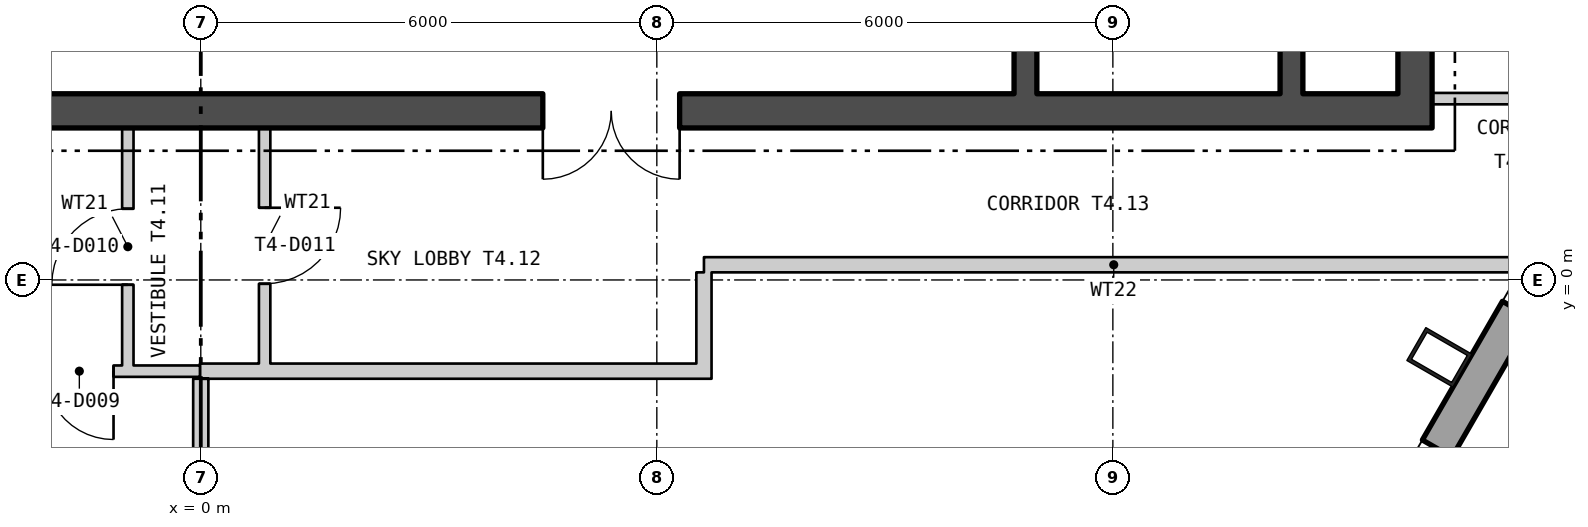
"""IFC4 building model, lengths in metres.
Left out: names, types, materials, properties, quantities, classifications, styles, units other than length and angle.
Written with IfcOpenShell. Run it as: python <this file> out.ifc"""

import sys

from ifc_helpers import new_model, si_unit, direction, frame, frame_2d, origin, origin_2d, place, context, subcontext, project, spatial, polyline, rectangle, hollow_rectangle, outline, extrude, element, fill, save


model = new_model("IFC4")
c1 = context("Model", 3, precision=1e-05, world=origin(), true_north=direction((0.0, 1.0)))
c2 = subcontext(c1, "Body", "Model", "MODEL_VIEW")
j1 = project(units=[si_unit("LENGTHUNIT", "METRE"), si_unit("PLANEANGLEUNIT", "RADIAN")], contexts=[c1])
p1 = place(None, origin())
s1 = spatial("IfcSite", under=j1, at=p1, CompositionType="ELEMENT")
p2 = place(p1, origin())
s2 = spatial("IfcBuilding", under=s1, at=p2, CompositionType="ELEMENT")
p3 = place(p2, frame((0.0, 0.0, 239.4)))
s3 = spatial("IfcBuildingStorey", under=s2, at=p3, CompositionType="ELEMENT", Elevation=239.4)
p4 = place(p3, frame((16.296, -1.018, 0.0), z_axis=(0.0, 0.0, 1.0), x_axis=(0.5, 0.866025403784, 0.0)))
e1 = element("IfcColumn", 1, at=p4, inside=s3, PredefinedType="COLUMN", context=c2, shape_type="SweptSolid", body=[
    extrude(hollow_rectangle(XDim=0.5, YDim=0.7, WallThickness=0.045, at=origin_2d()), origin(), (0.0, 0.0, 1.0), 6.0),
])
p5 = place(p3, frame((3.105, -25.015, -0.18), z_axis=(0.0, 0.0, 1.0), x_axis=(0.499999764979, 0.866025539474, 0.0)))
e2 = element("IfcWall", 2, at=p5, inside=s3, PredefinedType="SOLIDWALL", context=c2, shape_type="SweptSolid", body=[
    extrude(outline(polyline([(-0.13, -0.225), (45.87, -0.225), (45.61, 0.225), (0.13, 0.225), (-0.13, -0.225)])), origin(), (0.0, 0.0, 1.0), 6.0),
])
p6 = place(p5, frame((1.424, 0.0, 1.38)))
e3 = element("IfcOpeningElement", 3, at=p6, cuts=e2, PredefinedType="OPENING", context=c2, shape_type="SweptSolid", body=[
    extrude(rectangle(XDim=2.4, YDim=3.6, at=frame_2d((1.2, 1.8))), frame((0.0, 0.235, 0.0), z_axis=(0.0, -1.0, 0.0), x_axis=(1.0, 0.0, 0.0)), (0.0, 0.0, 1.0), 0.47),
])
p7 = place(p5, frame((5.893, 0.0, 1.38)))
e4 = element("IfcOpeningElement", 4, at=p7, cuts=e2, PredefinedType="OPENING", context=c2, shape_type="SweptSolid", body=[
    extrude(rectangle(XDim=2.4, YDim=3.6, at=frame_2d((1.2, 1.8))), frame((0.0, 0.235, 0.0), z_axis=(0.0, -1.0, 0.0), x_axis=(1.0, 0.0, 0.0)), (0.0, 0.0, 1.0), 0.47),
])
p8 = place(p5, frame((10.401, 0.0, 1.38)))
e5 = element("IfcOpeningElement", 5, at=p8, cuts=e2, PredefinedType="OPENING", context=c2, shape_type="SweptSolid", body=[
    extrude(rectangle(XDim=2.4, YDim=3.6, at=frame_2d((1.2, 1.8))), frame((0.0, 0.235, 0.0), z_axis=(0.0, -1.0, 0.0), x_axis=(1.0, 0.0, 0.0)), (0.0, 0.0, 1.0), 0.47),
])
p9 = place(p5, frame((14.909, 0.0, 1.38)))
e6 = element("IfcOpeningElement", 6, at=p9, cuts=e2, PredefinedType="OPENING", context=c2, shape_type="SweptSolid", body=[
    extrude(rectangle(XDim=2.4, YDim=3.6, at=frame_2d((1.2, 1.8))), frame((0.0, 0.235, 0.0), z_axis=(0.0, -1.0, 0.0), x_axis=(1.0, 0.0, 0.0)), (0.0, 0.0, 1.0), 0.47),
])
p10 = place(p5, frame((19.416, 0.0, 1.38)))
e7 = element("IfcOpeningElement", 7, at=p10, cuts=e2, PredefinedType="OPENING", context=c2, shape_type="SweptSolid", body=[
    extrude(rectangle(XDim=2.4, YDim=3.6, at=frame_2d((1.2, 1.8))), frame((0.0, 0.235, 0.0), z_axis=(0.0, -1.0, 0.0), x_axis=(1.0, 0.0, 0.0)), (0.0, 0.0, 1.0), 0.47),
])
p11 = place(p5, frame((23.924, 0.0, 1.38)))
e8 = element("IfcOpeningElement", 8, at=p11, cuts=e2, PredefinedType="OPENING", context=c2, shape_type="SweptSolid", body=[
    extrude(rectangle(XDim=2.4, YDim=3.6, at=frame_2d((1.2, 1.8))), frame((0.0, 0.235, 0.0), z_axis=(0.0, -1.0, 0.0), x_axis=(1.0, 0.0, 0.0)), (0.0, 0.0, 1.0), 0.47),
])
p12 = place(p5, frame((28.431, 0.0, 1.38)))
e9 = element("IfcOpeningElement", 9, at=p12, cuts=e2, PredefinedType="OPENING", context=c2, shape_type="SweptSolid", body=[
    extrude(rectangle(XDim=2.4, YDim=3.6, at=frame_2d((1.2, 1.8))), frame((0.0, 0.235, 0.0), z_axis=(0.0, -1.0, 0.0), x_axis=(1.0, 0.0, 0.0)), (0.0, 0.0, 1.0), 0.47),
])
p13 = place(p5, frame((32.939, 0.0, 1.38)))
e10 = element("IfcOpeningElement", 10, at=p13, cuts=e2, PredefinedType="OPENING", context=c2, shape_type="SweptSolid", body=[
    extrude(rectangle(XDim=2.4, YDim=3.6, at=frame_2d((1.2, 1.8))), frame((0.0, 0.235, 0.0), z_axis=(0.0, -1.0, 0.0), x_axis=(1.0, 0.0, 0.0)), (0.0, 0.0, 1.0), 0.47),
])
p14 = place(p5, frame((37.447, 0.0, 1.38)))
e11 = element("IfcOpeningElement", 11, at=p14, cuts=e2, PredefinedType="OPENING", context=c2, shape_type="SweptSolid", body=[
    extrude(rectangle(XDim=2.4, YDim=3.6, at=frame_2d((1.2, 1.8))), frame((0.0, 0.235, 0.0), z_axis=(0.0, -1.0, 0.0), x_axis=(1.0, 0.0, 0.0)), (0.0, 0.0, 1.0), 0.47),
])
p15 = place(p5, frame((41.916, 0.0, 1.38)))
e12 = element("IfcOpeningElement", 12, at=p15, cuts=e2, PredefinedType="OPENING", context=c2, shape_type="SweptSolid", body=[
    extrude(rectangle(XDim=2.4, YDim=3.6, at=frame_2d((1.2, 1.8))), frame((0.0, 0.235, 0.0), z_axis=(0.0, -1.0, 0.0), x_axis=(1.0, 0.0, 0.0)), (0.0, 0.0, 1.0), 0.47),
])
p16 = place(p3, frame((-16.2, 2.225, 0.0), z_axis=(0.0, 0.0, 1.0), x_axis=(1.0, 0.0, 0.0)))
e13 = element("IfcWall", 13, at=p16, inside=s3, PredefinedType="SHEAR", context=c2, shape_type="SweptSolid", body=[
    extrude(rectangle(XDim=32.4, YDim=0.45, at=frame_2d((16.2, 0.0))), origin(), (0.0, 0.0, 1.0), 5.8),
])
p17 = place(p16, frame((10.7, 0.0, 0.0)))
e14 = element("IfcOpeningElement", 14, at=p17, cuts=e13, PredefinedType="OPENING", context=c2, shape_type="SweptSolid", body=[
    extrude(rectangle(XDim=1.8, YDim=2.4, at=frame_2d((0.9, 1.2))), frame((0.0, 0.235, 0.0), z_axis=(0.0, -1.0, 0.0), x_axis=(1.0, 0.0, 0.0)), (0.0, 0.0, 1.0), 0.47),
])
p18 = place(p16, frame((20.7, 0.0, 0.0)))
e15 = element("IfcOpeningElement", 15, at=p18, cuts=e13, PredefinedType="OPENING", context=c2, shape_type="SweptSolid", body=[
    extrude(rectangle(XDim=1.8, YDim=2.4, at=frame_2d((0.9, 1.2))), frame((0.0, 0.235, 0.0), z_axis=(0.0, -1.0, 0.0), x_axis=(1.0, 0.0, 0.0)), (0.0, 0.0, 1.0), 0.47),
])
p19 = place(p3, frame((15.975, 2.45, 0.0), z_axis=(0.0, 0.0, 1.0), x_axis=(0.0, 1.0, 0.0)))
e16 = element("IfcWall", 16, at=p19, inside=s3, PredefinedType="SHEAR", context=c2, shape_type="SweptSolid", body=[
    extrude(rectangle(XDim=15.1, YDim=0.45, at=frame_2d((7.55, 0.0))), origin(), (0.0, 0.0, 1.0), 5.8),
])
p20 = place(p19, frame((4.4, 0.0, 0.0)))
e17 = element("IfcOpeningElement", 17, at=p20, cuts=e16, PredefinedType="OPENING", context=c2, shape_type="SweptSolid", body=[
    extrude(rectangle(XDim=1.5, YDim=2.1, at=frame_2d((0.75, 1.05))), frame((0.0, 0.235, 0.0), z_axis=(0.0, -1.0, 0.0), x_axis=(1.0, 0.0, 0.0)), (0.0, 0.0, 1.0), 0.47),
])
p21 = place(p19, frame((1.086, 0.0, 0.0)))
e18 = element("IfcOpeningElement", 18, at=p21, cuts=e16, PredefinedType="OPENING", context=c2, shape_type="SweptSolid", body=[
    extrude(rectangle(XDim=0.9, YDim=2.1, at=frame_2d((0.45, 1.05))), frame((0.0, 0.235, 0.0), z_axis=(0.0, -1.0, 0.0), x_axis=(1.0, 0.0, 0.0)), (0.0, 0.0, 1.0), 0.47),
])
p22 = place(p19, frame((3.05, 0.0, 0.0)))
e19 = element("IfcOpeningElement", 19, at=p22, cuts=e16, PredefinedType="OPENING", context=c2, shape_type="SweptSolid", body=[
    extrude(rectangle(XDim=0.9, YDim=2.1, at=frame_2d((0.45, 1.05))), frame((0.0, 0.235, 0.0), z_axis=(0.0, -1.0, 0.0), x_axis=(1.0, 0.0, 0.0)), (0.0, 0.0, 1.0), 0.47),
])
p23 = place(p19, frame((6.646, 0.0, 0.0)))
e20 = element("IfcOpeningElement", 20, at=p23, cuts=e16, PredefinedType="OPENING", context=c2, shape_type="SweptSolid", body=[
    extrude(rectangle(XDim=1.0, YDim=2.1, at=frame_2d((0.5, 1.05))), frame((0.0, 0.235, 0.0), z_axis=(0.0, -1.0, 0.0), x_axis=(1.0, 0.0, 0.0)), (0.0, 0.0, 1.0), 0.47),
])
p24 = place(p19, frame((11.296, 0.0, 0.0)))
e21 = element("IfcOpeningElement", 21, at=p24, cuts=e16, PredefinedType="OPENING", context=c2, shape_type="SweptSolid", body=[
    extrude(rectangle(XDim=0.9, YDim=2.1, at=frame_2d((0.45, 1.05))), frame((0.0, 0.235, 0.0), z_axis=(0.0, -1.0, 0.0), x_axis=(1.0, 0.0, 0.0)), (0.0, 0.0, 1.0), 0.47),
])
p25 = place(p3, frame((10.85, 2.45, 0.0), z_axis=(0.0, 0.0, 1.0), x_axis=(0.0, 1.0, 0.0)))
e22 = element("IfcWall", 22, at=p25, inside=s3, PredefinedType="SHEAR", context=c2, shape_type="SweptSolid", body=[
    extrude(rectangle(XDim=15.1, YDim=0.3, at=frame_2d((7.55, 0.0))), origin(), (0.0, 0.0, 1.0), 5.8),
])
p26 = place(p25, frame((3.525, 0.0, 0.0)))
e23 = element("IfcOpeningElement", 23, at=p26, cuts=e22, PredefinedType="OPENING", context=c2, shape_type="SweptSolid", body=[
    extrude(rectangle(XDim=1.25, YDim=2.1, at=frame_2d((0.625, 1.05))), frame((0.0, 0.16, 0.0), z_axis=(0.0, -1.0, 0.0), x_axis=(1.0, 0.0, 0.0)), (0.0, 0.0, 1.0), 0.32),
])
p27 = place(p25, frame((1.15, 0.0, 0.0)))
e24 = element("IfcOpeningElement", 24, at=p27, cuts=e22, PredefinedType="OPENING", context=c2, shape_type="SweptSolid", body=[
    extrude(rectangle(XDim=1.0, YDim=2.1, at=frame_2d((0.5, 1.05))), frame((0.0, 0.16, 0.0), z_axis=(0.0, -1.0, 0.0), x_axis=(1.0, 0.0, 0.0)), (0.0, 0.0, 1.0), 0.32),
])
p28 = place(p3, frame((14.35, 2.45, 0.0), z_axis=(0.0, 0.0, 1.0), x_axis=(0.0, 1.0, 0.0)))
e25 = element("IfcWall", 25, at=p28, inside=s3, PredefinedType="SHEAR", context=c2, shape_type="SweptSolid", body=[
    extrude(rectangle(XDim=15.1, YDim=0.3, at=frame_2d((7.55, 0.0))), origin(), (0.0, 0.0, 1.0), 5.8),
])
p29 = place(p28, frame((4.4, 0.0, 0.0)))
e26 = element("IfcOpeningElement", 26, at=p29, cuts=e25, PredefinedType="OPENING", context=c2, shape_type="SweptSolid", body=[
    extrude(rectangle(XDim=1.5, YDim=2.1, at=frame_2d((0.75, 1.05))), frame((0.0, 0.16, 0.0), z_axis=(0.0, -1.0, 0.0), x_axis=(1.0, 0.0, 0.0)), (0.0, 0.0, 1.0), 0.32),
])
p30 = place(p3, frame((-4.631, -1.2, 0.0), z_axis=(0.0, 0.0, 1.0), x_axis=(1.0, 0.0, 0.0)))
e27 = element("IfcWall", 27, at=p30, inside=s3, PredefinedType="PARTITIONING", context=c2, shape_type="SweptSolid", body=[
    extrude(rectangle(XDim=4.62, YDim=0.15, at=frame_2d((2.31, 0.0))), origin(), (0.0, 0.0, 1.0), 5.8),
])
p31 = place(p30, frame((2.583, 0.0, 0.0)))
e28 = element("IfcOpeningElement", 28, at=p31, cuts=e27, PredefinedType="OPENING", context=c2, shape_type="SweptSolid", body=[
    extrude(rectangle(XDim=0.9, YDim=2.1, at=frame_2d((0.45, 1.05))), frame((0.0, 0.085, 0.0), z_axis=(0.0, -1.0, 0.0), x_axis=(1.0, 0.0, 0.0)), (0.0, 0.0, 1.0), 0.17),
])
p32 = place(p3, frame((-0.96, -1.125, 0.0), z_axis=(0.0, 0.0, 1.0), x_axis=(0.0, 1.0, 0.0)))
e29 = element("IfcWall", 29, at=p32, inside=s3, PredefinedType="PARTITIONING", context=c2, shape_type="SweptSolid", body=[
    extrude(rectangle(XDim=3.125, YDim=0.15, at=frame_2d((1.562, 0.0))), origin(), (0.0, 0.0, 1.0), 5.8),
])
p33 = place(p32, frame((1.062, 0.0, 0.0)))
e30 = element("IfcOpeningElement", 30, at=p33, cuts=e29, PredefinedType="OPENING", context=c2, shape_type="SweptSolid", body=[
    extrude(rectangle(XDim=1.0, YDim=2.1, at=frame_2d((0.5, 1.05))), frame((0.0, 0.085, 0.0), z_axis=(0.0, -1.0, 0.0), x_axis=(1.0, 0.0, 0.0)), (0.0, 0.0, 1.0), 0.17),
])
p34 = place(p3, frame((-0.011, -1.2, 0.0), z_axis=(0.0, 0.0, 1.0), x_axis=(1.0, 0.0, 0.0)))
e31 = element("IfcWall", 31, at=p34, inside=s3, PredefinedType="PARTITIONING", context=c2, shape_type="SweptSolid", body=[
    extrude(rectangle(XDim=6.731, YDim=0.2, at=frame_2d((3.365, 0.0))), origin(), (0.0, 0.0, 1.0), 5.8),
])
p35 = place(p3, frame((-0.001, -3.1, 0.0), z_axis=(0.0, 0.0, 1.0), x_axis=(0.000444444401, 0.999999901235, 0.0)))
e32 = element("IfcWall", 32, at=p35, inside=s3, PredefinedType="PARTITIONING", context=c2, shape_type="SweptSolid", body=[
    extrude(rectangle(XDim=1.8, YDim=0.2, at=frame_2d((0.9, 0.0))), origin(), (0.0, 0.0, 1.0), 5.3),
])
p36 = place(p3, frame((0.84, -1.1, 0.0), z_axis=(0.0, 0.0, 1.0), x_axis=(0.0, 1.0, 0.0)))
e33 = element("IfcWall", 33, at=p36, inside=s3, PredefinedType="PARTITIONING", context=c2, shape_type="SweptSolid", body=[
    extrude(rectangle(XDim=3.1, YDim=0.15, at=frame_2d((1.55, 0.0))), origin(), (0.0, 0.0, 1.0), 5.8),
])
p37 = place(p36, frame((1.05, 0.0, 0.0)))
e34 = element("IfcOpeningElement", 34, at=p37, cuts=e33, PredefinedType="OPENING", context=c2, shape_type="SweptSolid", body=[
    extrude(rectangle(XDim=1.0, YDim=2.1, at=frame_2d((0.5, 1.05))), frame((0.0, 0.085, 0.0), z_axis=(0.0, -1.0, 0.0), x_axis=(1.0, 0.0, 0.0)), (0.0, 0.0, 1.0), 0.17),
])
p38 = place(p3, frame((6.62, -1.1, 0.0), z_axis=(0.0, 0.0, 1.0), x_axis=(0.0, 1.0, 0.0)))
e35 = element("IfcWall", 35, at=p38, inside=s3, PredefinedType="PARTITIONING", context=c2, shape_type="SweptSolid", body=[
    extrude(rectangle(XDim=1.2, YDim=0.2, at=frame_2d((0.6, 0.0))), origin(), (0.0, 0.0, 1.0), 5.8),
])
p39 = place(p3, frame((6.62, 0.2, 0.0), z_axis=(0.0, 0.0, 1.0), x_axis=(1.0, 0.0, 0.0)))
e36 = element("IfcWall", 36, at=p39, inside=s3, PredefinedType="PARTITIONING", context=c2, shape_type="SweptSolid", body=[
    extrude(rectangle(XDim=10.783, YDim=0.2, at=frame_2d((5.391, 0.0))), origin(), (0.0, 0.0, 1.0), 5.8),
])
p40 = place(p3, frame((16.2, 2.386, 0.0), z_axis=(0.0, 0.0, 1.0), x_axis=(1.0, 0.0, 0.0)))
e37 = element("IfcWall", 37, at=p40, inside=s3, PredefinedType="PARTITIONING", context=c2, shape_type="SweptSolid", body=[
    extrude(rectangle(XDim=1.657, YDim=0.15, at=frame_2d((0.829, 0.0))), origin(), (0.0, 0.0, 1.0), 5.8),
])
p41 = place(p18, origin())
e38 = element("IfcDoor", 38, at=p41, inside=s3, OperationType="DOUBLE_DOOR_SINGLE_SWING", PredefinedType="DOOR", context=c2, shape_type="SweptSolid", body=[
    extrude(rectangle(XDim=1.8, YDim=2.4, at=frame_2d((0.9, 1.2))), frame((0.0, 0.025, 0.0), z_axis=(0.0, -1.0, 0.0), x_axis=(1.0, 0.0, 0.0)), (0.0, 0.0, 1.0), 0.05),
])
fill(e15, e38)
p42 = place(p31, origin())
e39 = element("IfcDoor", 39, at=p42, inside=s3, OperationType="SINGLE_SWING_RIGHT", PredefinedType="DOOR", context=c2, shape_type="SweptSolid", body=[
    extrude(rectangle(XDim=0.9, YDim=2.1, at=frame_2d((0.45, 1.05))), frame((0.0, 0.025, 0.0), z_axis=(0.0, -1.0, 0.0), x_axis=(1.0, 0.0, 0.0)), (0.0, 0.0, 1.0), 0.05),
])
fill(e28, e39)
p43 = place(p33, origin())
e40 = element("IfcDoor", 40, at=p43, inside=s3, OperationType="SINGLE_SWING_RIGHT", PredefinedType="DOOR", context=c2, shape_type="SweptSolid", body=[
    extrude(rectangle(XDim=1.0, YDim=2.1, at=frame_2d((0.5, 1.05))), frame((0.0, 0.025, 0.0), z_axis=(0.0, -1.0, 0.0), x_axis=(1.0, 0.0, 0.0)), (0.0, 0.0, 1.0), 0.05),
])
fill(e30, e40)
p44 = place(p37, origin())
e41 = element("IfcDoor", 41, at=p44, inside=s3, OperationType="SINGLE_SWING_RIGHT", PredefinedType="DOOR", context=c2, shape_type="SweptSolid", body=[
    extrude(rectangle(XDim=1.0, YDim=2.1, at=frame_2d((0.5, 1.05))), frame((0.0, 0.025, 0.0), z_axis=(0.0, -1.0, 0.0), x_axis=(1.0, 0.0, 0.0)), (0.0, 0.0, 1.0), 0.05),
])
fill(e34, e41)
save(model, sys.argv[1])
